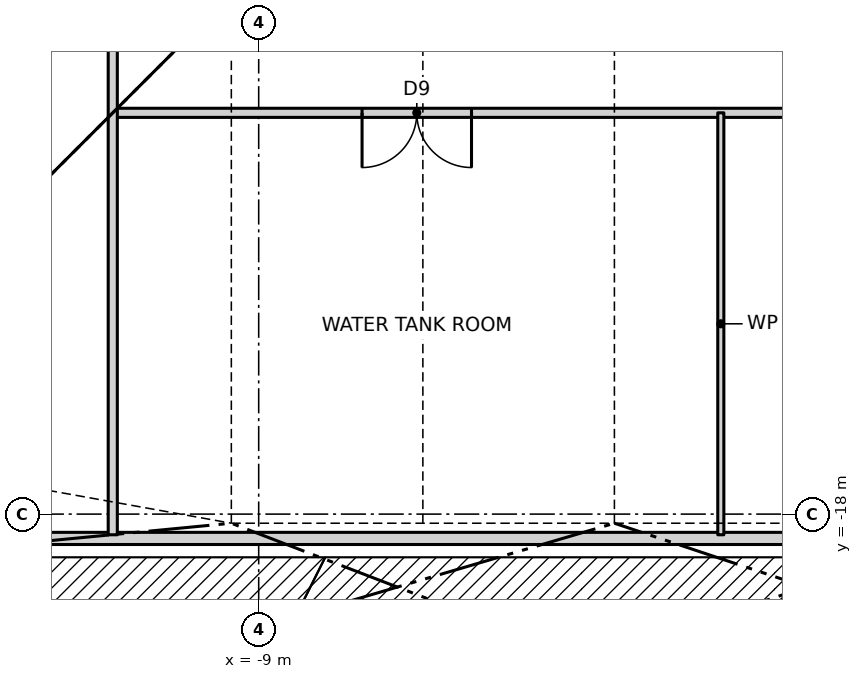
"""IFC4 building model, lengths in metres.
Left out: names, types, materials, properties, quantities, classifications, styles, units other than length and angle.
Written with IfcOpenShell. Run it as: python <this file> out.ifc"""

import sys

from ifc_helpers import new_model, si_unit, direction, frame, frame_2d, origin, origin_2d, place, context, subcontext, project, spatial, rectangle, hollow_rectangle, extrude, clip, halfspace, element, fill, save


model = new_model("IFC4")
c1 = context("Model", 3, precision=1e-05, world=origin(), true_north=direction((0.0, 1.0)))
c2 = subcontext(c1, "Body", "Model", "MODEL_VIEW")
j1 = project(units=[si_unit("LENGTHUNIT", "METRE"), si_unit("PLANEANGLEUNIT", "RADIAN")], contexts=[c1])
p1 = place(None, origin())
s1 = spatial("IfcSite", under=j1, at=p1, CompositionType="ELEMENT")
p2 = place(p1, origin())
s2 = spatial("IfcBuilding", under=s1, at=p2, CompositionType="ELEMENT")
p3 = place(p2, frame((0.0, 0.0, 143.5)))
s3 = spatial("IfcBuildingStorey", under=s2, at=p3, CompositionType="ELEMENT", Elevation=143.5)
p4 = place(p3, frame((-10.8, -20.4, 0.0), z_axis=(0.206163197348, 0.343580475001, 0.916214600002), x_axis=(-0.857476506072, 0.514523120505, 0.0)))
e1 = element("IfcColumn", 1, at=p4, inside=s3, PredefinedType="COLUMN", context=c2, shape_type="Clipping", body=[
    clip(clip(extrude(hollow_rectangle(XDim=0.8, YDim=0.8, WallThickness=0.07, at=origin_2d()), origin(), (0.0, 0.0, 1.0), 6.549), halfspace(frame((0.0, 0.0, 0.0), z_axis=(0.0, -0.400687916891, -0.916214600002), x_axis=(-0.857476506072, -0.471413595046, 0.206163197348)), False)), halfspace(frame((0.0, 2.404, 5.497), z_axis=(0.0, 0.400687916891, 0.916214600002), x_axis=(-0.857476506072, -0.471413595046, 0.206163197348)), False)),
])
p5 = place(p3, frame((-3.6, -20.4, 0.0), z_axis=(0.07008242466, 0.350260100688, 0.934026935168), x_axis=(-0.980564303347, 0.196197979098, 0.0)))
e2 = element("IfcColumn", 2, at=p5, inside=s3, PredefinedType="COLUMN", context=c2, shape_type="Clipping", body=[
    clip(clip(extrude(hollow_rectangle(XDim=0.8, YDim=0.8, WallThickness=0.07, at=origin_2d()), origin(), (0.0, 0.0, 1.0), 6.424), halfspace(frame((0.0, 0.0, 0.0), z_axis=(0.0, -0.35720258171, -0.934026935168), x_axis=(-0.980564303347, -0.183254197104, 0.07008242466)), False)), halfspace(frame((0.0, 2.143, 5.604), z_axis=(0.0, 0.35720258171, 0.934026935168), x_axis=(-0.980564303347, -0.183254197104, 0.07008242466)), False)),
])
p6 = place(p3, frame((-15.545, -18.4, 0.0), z_axis=(0.0, 0.0, 1.0), x_axis=(1.0, 0.0, 0.0)))
e3 = element("IfcWall", 3, at=p6, inside=s3, PredefinedType="PARTITIONING", context=c2, shape_type="SweptSolid", body=[
    extrude(rectangle(XDim=31.09, YDim=0.2, at=frame_2d((15.545, 0.0))), origin(), (0.0, 0.0, 1.0), 5.7),
])
p7 = place(p3, frame((-11.4, -11.4, 0.0), z_axis=(0.0, 0.0, 1.0), x_axis=(1.0, 0.0, 0.0)))
e4 = element("IfcWall", 4, at=p7, inside=s3, PredefinedType="PARTITIONING", context=c2, shape_type="SweptSolid", body=[
    extrude(rectangle(XDim=29.74, YDim=0.15, at=frame_2d((14.87, 0.0))), origin(), (0.0, 0.0, 1.0), 5.77),
])
p8 = place(p7, frame((4.1, 0.0, 0.0)))
e5 = element("IfcOpeningElement", 5, at=p8, cuts=e4, PredefinedType="OPENING", context=c2, shape_type="SweptSolid", body=[
    extrude(rectangle(XDim=1.8, YDim=2.1, at=frame_2d((0.9, 1.05))), frame((0.0, 0.085, 0.0), z_axis=(0.0, -1.0, 0.0), x_axis=(1.0, 0.0, 0.0)), (0.0, 0.0, 1.0), 0.17),
])
p9 = place(p7, frame((12.6, 0.0, 0.0)))
e6 = element("IfcOpeningElement", 6, at=p9, cuts=e4, PredefinedType="OPENING", context=c2, shape_type="SweptSolid", body=[
    extrude(rectangle(XDim=1.8, YDim=2.1, at=frame_2d((0.9, 1.05))), frame((0.0, 0.085, 0.0), z_axis=(0.0, -1.0, 0.0), x_axis=(1.0, 0.0, 0.0)), (0.0, 0.0, 1.0), 0.17),
])
p10 = place(p7, frame((19.0, 0.0, 0.0)))
e7 = element("IfcOpeningElement", 7, at=p10, cuts=e4, PredefinedType="OPENING", context=c2, shape_type="SweptSolid", body=[
    extrude(rectangle(XDim=1.8, YDim=2.1, at=frame_2d((0.9, 1.05))), frame((0.0, 0.085, 0.0), z_axis=(0.0, -1.0, 0.0), x_axis=(1.0, 0.0, 0.0)), (0.0, 0.0, 1.0), 0.17),
])
p11 = place(p3, frame((-1.4, -18.34, 0.0), z_axis=(0.0, 0.0, 1.0), x_axis=(0.0, 1.0, 0.0)))
e8 = element("IfcWall", 8, at=p11, inside=s3, PredefinedType="PARTITIONING", context=c2, shape_type="SweptSolid", body=[
    extrude(rectangle(XDim=6.94, YDim=0.1, at=frame_2d((3.47, 0.0))), origin(), (0.0, 0.0, 1.0), 5.77),
])
p12 = place(p3, frame((-11.4, -18.34, 0.0), z_axis=(0.0, 0.0, 1.0), x_axis=(0.0, 1.0, 0.0)))
e9 = element("IfcWall", 9, at=p12, inside=s3, PredefinedType="PARTITIONING", context=c2, shape_type="SweptSolid", body=[
    extrude(rectangle(XDim=29.74, YDim=0.15, at=frame_2d((14.87, 0.0))), origin(), (0.0, 0.0, 1.0), 5.77),
])
p13 = place(p12, frame((17.44, 0.0, 0.0)))
e10 = element("IfcOpeningElement", 10, at=p13, cuts=e9, PredefinedType="OPENING", context=c2, shape_type="SweptSolid", body=[
    extrude(rectangle(XDim=1.8, YDim=2.1, at=frame_2d((0.9, 1.05))), frame((0.0, 0.085, 0.0), z_axis=(0.0, -1.0, 0.0), x_axis=(1.0, 0.0, 0.0)), (0.0, 0.0, 1.0), 0.17),
])
p14 = place(p8, frame((1.8, 0.0, 0.0), z_axis=(0.0, 0.0, 1.0), x_axis=(-1.0, 0.0, 0.0)))
e11 = element("IfcDoor", 11, at=p14, inside=s3, OperationType="DOUBLE_DOOR_SINGLE_SWING", PredefinedType="DOOR", context=c2, shape_type="SweptSolid", body=[
    extrude(rectangle(XDim=1.8, YDim=2.1, at=frame_2d((0.9, 1.05))), frame((0.0, 0.025, 0.0), z_axis=(0.0, -1.0, 0.0), x_axis=(1.0, 0.0, 0.0)), (0.0, 0.0, 1.0), 0.05),
])
fill(e5, e11)
save(model, sys.argv[1])
